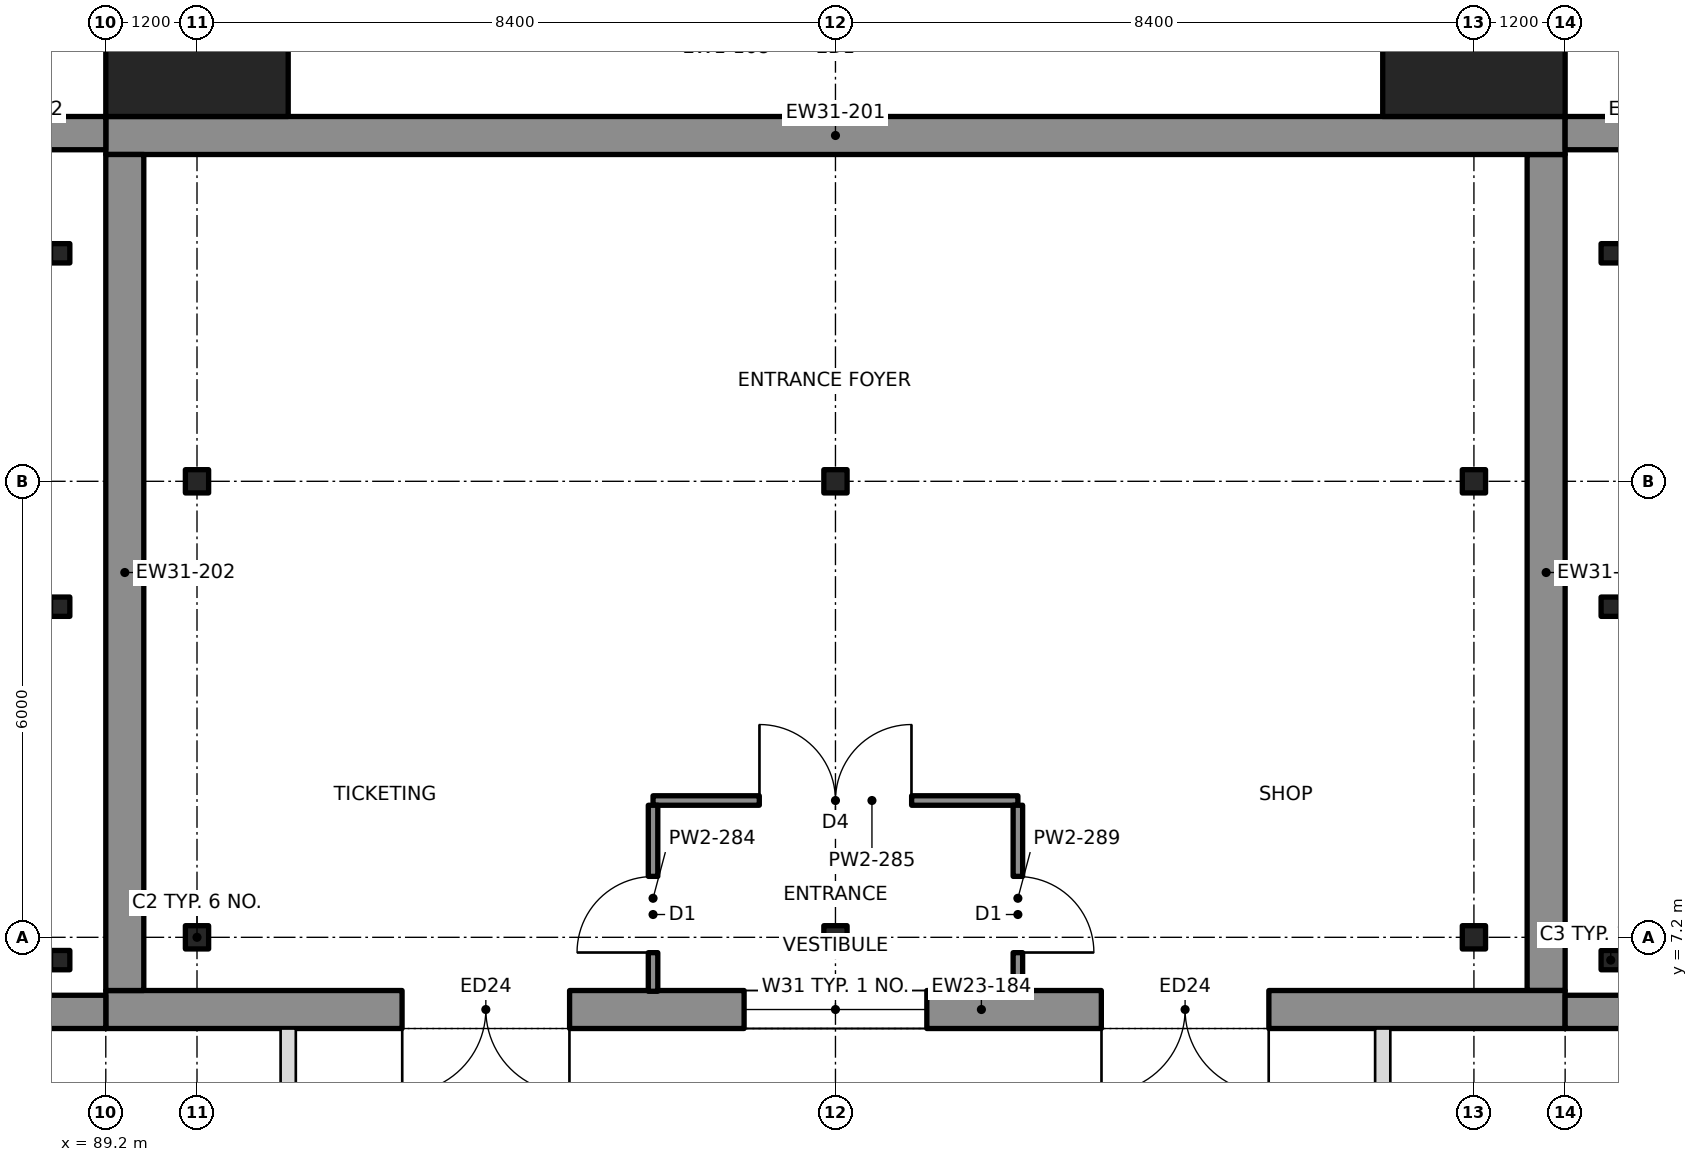
"""IFC4 building model, lengths in metres.
Left out: names, types, materials, properties, quantities, classifications, styles, units other than length and angle.
Written with IfcOpenShell. Run it as: python <this file> out.ifc"""

import sys

from ifc_helpers import new_model, si_unit, direction, frame, frame_2d, origin, origin_2d, place, context, subcontext, project, spatial, rectangle, i_section, extrude, element, fill, save


model = new_model("IFC4")
c1 = context("Model", 3, precision=1e-05, world=origin(), true_north=direction((0.0, 1.0)))
c2 = subcontext(c1, "Body", "Model", "MODEL_VIEW")
j1 = project(units=[si_unit("LENGTHUNIT", "METRE"), si_unit("PLANEANGLEUNIT", "RADIAN")], contexts=[c1])
p1 = place(None, origin())
s1 = spatial("IfcSite", under=j1, at=p1, CompositionType="ELEMENT")
p2 = place(p1, origin())
s2 = spatial("IfcBuilding", under=s1, at=p2, CompositionType="ELEMENT")
p3 = place(p2, origin())
s3 = spatial("IfcBuildingStorey", under=s2, at=p3, CompositionType="ELEMENT", Elevation=0.0)
for number, where, z_axis, x_axis in (
    (1, (90.4, 19.2, -0.9), (0.0, 0.0, 1.0), (1.0, 0.0, 0.0)),
    (2, (107.2, 19.2, -0.9), (0.0, 0.0, 1.0), (1.0, 0.0, 0.0)),
):
    element("IfcColumn", number, at=place(p3, frame(where, z_axis=z_axis, x_axis=x_axis)), inside=s3, PredefinedType="COLUMN", context=c2, shape_type="SweptSolid", body=[
        extrude(rectangle(XDim=2.4, YDim=2.4, at=origin_2d()), origin(), (0.0, 0.0, 1.0), 5.3),
    ])
for number, where, z_axis, x_axis in (
    (3, (90.4, 7.2, -1.5), (0.0, 0.0, 1.0), (1.0, 0.0, 0.0)),
    (4, (90.4, 13.2, -1.5), (0.0, 0.0, 1.0), (1.0, 0.0, 0.0)),
    (5, (98.8, 7.2, -1.5), (0.0, 0.0, 1.0), (1.0, 0.0, 0.0)),
    (6, (98.8, 13.2, -1.5), (0.0, 0.0, 1.0), (1.0, 0.0, 0.0)),
    (7, (107.2, 7.2, -1.5), (0.0, 0.0, 1.0), (1.0, 0.0, 0.0)),
    (8, (107.2, 13.2, -1.5), (0.0, 0.0, 1.0), (1.0, 0.0, 0.0)),
):
    element("IfcColumn", number, at=place(p3, frame(where, z_axis=z_axis, x_axis=x_axis)), inside=s3, PredefinedType="COLUMN", context=c2, shape_type="SweptSolid", body=[
        extrude(i_section(OverallWidth=0.306, OverallDepth=0.311, WebThickness=0.011, FlangeThickness=0.017, at=origin_2d()), origin(), (0.0, 0.0, 1.0), 5.9),
    ])
for number, where, z_axis, x_axis in (
    (9, (88.6, 6.9, -1.5), (0.0, 0.0, 1.0), (1.0, 0.0, 0.0)),
    (10, (88.6, 11.55, -1.5), (0.0, 0.0, 1.0), (1.0, 0.0, 0.0)),
    (11, (88.6, 16.2, -1.5), (0.0, 0.0, 1.0), (1.0, 0.0, 0.0)),
    (12, (109.0, 6.9, -1.5), (0.0, 0.0, 1.0), (1.0, 0.0, 0.0)),
    (13, (109.0, 11.55, -1.5), (0.0, 0.0, 1.0), (1.0, 0.0, 0.0)),
    (14, (109.0, 16.2, -1.5), (0.0, 0.0, 1.0), (1.0, 0.0, 0.0)),
):
    element("IfcColumn", number, at=place(p3, frame(where, z_axis=z_axis, x_axis=x_axis)), inside=s3, PredefinedType="COLUMN", context=c2, shape_type="SweptSolid", body=[
        extrude(i_section(OverallWidth=0.254, OverallDepth=0.253, WebThickness=0.009, FlangeThickness=0.014, at=origin_2d()), origin(), (0.0, 0.0, 1.0), 5.345),
    ])
for number, where, z_axis, x_axis in (
    (15, (89.45, 6.5, 0.0), (0.0, 0.0, 1.0), (0.0, 1.0, 0.0)),
    (16, (108.15, 6.5, 0.0), (0.0, 0.0, 1.0), (0.0, 1.0, 0.0)),
):
    element("IfcWall", number, at=place(p3, frame(where, z_axis=z_axis, x_axis=x_axis)), inside=s3, PredefinedType="SOLIDWALL", context=c2, shape_type="SweptSolid", body=[
        extrude(rectangle(XDim=11.0, YDim=0.5, at=frame_2d((5.5, 0.0))), origin(), (0.0, 0.0, 1.0), 4.4),
    ])
p4 = place(p3, frame((89.2, 6.25, 0.0), z_axis=(0.0, 0.0, 1.0), x_axis=(1.0, 0.0, 0.0)))
e17 = element("IfcWall", 17, at=p4, inside=s3, PredefinedType="SOLIDWALL", context=c2, shape_type="SweptSolid", body=[
    extrude(rectangle(XDim=19.2, YDim=0.5, at=frame_2d((9.6, 0.0))), origin(), (0.0, 0.0, 1.0), 4.4),
])
p5 = place(p4, frame((3.9, 0.0, 0.0)))
e18 = element("IfcOpeningElement", 18, at=p5, cuts=e17, PredefinedType="OPENING", context=c2, shape_type="SweptSolid", body=[
    extrude(rectangle(XDim=2.2, YDim=2.7, at=frame_2d((1.1, 1.35))), frame((0.0, 0.26, 0.0), z_axis=(0.0, -1.0, 0.0), x_axis=(1.0, 0.0, 0.0)), (0.0, 0.0, 1.0), 0.52),
])
p6 = place(p4, frame((13.1, 0.0, 0.0)))
e19 = element("IfcOpeningElement", 19, at=p6, cuts=e17, PredefinedType="OPENING", context=c2, shape_type="SweptSolid", body=[
    extrude(rectangle(XDim=2.2, YDim=2.7, at=frame_2d((1.1, 1.35))), frame((0.0, 0.26, 0.0), z_axis=(0.0, -1.0, 0.0), x_axis=(1.0, 0.0, 0.0)), (0.0, 0.0, 1.0), 0.52),
])
p7 = place(p4, frame((8.4, 0.0, 0.6)))
e20 = element("IfcOpeningElement", 20, at=p7, cuts=e17, PredefinedType="OPENING", context=c2, shape_type="SweptSolid", body=[
    extrude(rectangle(XDim=2.4, YDim=3.0, at=frame_2d((1.2, 1.5))), frame((0.0, 0.26, 0.0), z_axis=(0.0, -1.0, 0.0), x_axis=(1.0, 0.0, 0.0)), (0.0, 0.0, 1.0), 0.52),
])
p8 = place(p3, frame((89.2, 17.75, 0.0), z_axis=(0.0, 0.0, 1.0), x_axis=(1.0, 0.0, 0.0)))
e21 = element("IfcWall", 21, at=p8, inside=s3, PredefinedType="SOLIDWALL", context=c2, shape_type="SweptSolid", body=[
    extrude(rectangle(XDim=19.2, YDim=0.5, at=frame_2d((9.6, 0.0))), origin(), (0.0, 0.0, 1.0), 4.4),
])
p9 = place(p3, frame((86.038, 6.219, 0.0), z_axis=(0.0, 0.0, 1.0), x_axis=(1.0, 0.0, 0.0)))
e22 = element("IfcWall", 22, at=p9, inside=s3, PredefinedType="SOLIDWALL", context=c2, shape_type="SweptSolid", body=[
    extrude(rectangle(XDim=3.162, YDim=0.438, at=frame_2d((1.581, 0.0))), origin(), (0.0, 0.0, 1.0), 4.4),
])
p10 = place(p3, frame((86.75, 17.781, -0.9), z_axis=(0.0, 0.0, 1.0), x_axis=(1.0, 0.0, 0.0)))
e23 = element("IfcWall", 23, at=p10, inside=s3, PredefinedType="SOLIDWALL", context=c2, shape_type="SweptSolid", body=[
    extrude(rectangle(XDim=2.45, YDim=0.438, at=frame_2d((1.225, 0.0))), origin(), (0.0, 0.0, 1.0), 5.3),
])
p11 = place(p3, frame((108.4, 6.219, 0.0), z_axis=(0.0, 0.0, 1.0), x_axis=(1.0, 0.0, 0.0)))
e24 = element("IfcWall", 24, at=p11, inside=s3, PredefinedType="SOLIDWALL", context=c2, shape_type="SweptSolid", body=[
    extrude(rectangle(XDim=3.163, YDim=0.438, at=frame_2d((1.581, 0.0))), origin(), (0.0, 0.0, 1.0), 4.4),
])
p12 = place(p3, frame((108.4, 17.781, -0.9), z_axis=(0.0, 0.0, 1.0), x_axis=(1.0, 0.0, 0.0)))
e25 = element("IfcWall", 25, at=p12, inside=s3, PredefinedType="SOLIDWALL", context=c2, shape_type="SweptSolid", body=[
    extrude(rectangle(XDim=2.45, YDim=0.438, at=frame_2d((1.225, 0.0))), origin(), (0.0, 0.0, 1.0), 5.3),
])
p13 = place(p3, frame((96.4, 9.0, 0.0), z_axis=(0.0, 0.0, 1.0), x_axis=(1.0, 0.0, 0.0)))
e26 = element("IfcWall", 26, at=p13, inside=s3, PredefinedType="PARTITIONING", context=c2, shape_type="SweptSolid", body=[
    extrude(rectangle(XDim=4.8, YDim=0.125, at=frame_2d((2.4, 0.0))), origin(), (0.0, 0.0, 1.0), 3.65),
])
p14 = place(p13, frame((1.4, 0.0, 0.0)))
e27 = element("IfcOpeningElement", 27, at=p14, cuts=e26, PredefinedType="OPENING", context=c2, shape_type="SweptSolid", body=[
    extrude(rectangle(XDim=2.0, YDim=2.1, at=frame_2d((1.0, 1.05))), frame((0.0, 0.073, 0.0), z_axis=(0.0, -1.0, 0.0), x_axis=(1.0, 0.0, 0.0)), (0.0, 0.0, 1.0), 0.145),
])
p15 = place(p3, frame((96.4, 6.49, 0.0), z_axis=(0.0, 0.0, 1.0), x_axis=(0.0, 1.0, 0.0)))
e28 = element("IfcWall", 28, at=p15, inside=s3, PredefinedType="PARTITIONING", context=c2, shape_type="SweptSolid", body=[
    extrude(rectangle(XDim=2.448, YDim=0.125, at=frame_2d((1.224, 0.0))), origin(), (0.0, 0.0, 1.0), 3.65),
])
p16 = place(p15, frame((0.51, 0.0, 0.0)))
e29 = element("IfcOpeningElement", 29, at=p16, cuts=e28, PredefinedType="OPENING", context=c2, shape_type="SweptSolid", body=[
    extrude(rectangle(XDim=1.0, YDim=2.1, at=frame_2d((0.5, 1.05))), frame((0.0, 0.073, 0.0), z_axis=(0.0, -1.0, 0.0), x_axis=(1.0, 0.0, 0.0)), (0.0, 0.0, 1.0), 0.145),
])
p17 = place(p3, frame((101.2, 6.49, 0.0), z_axis=(0.0, 0.0, 1.0), x_axis=(0.0, 1.0, 0.0)))
e30 = element("IfcWall", 30, at=p17, inside=s3, PredefinedType="PARTITIONING", context=c2, shape_type="SweptSolid", body=[
    extrude(rectangle(XDim=2.448, YDim=0.125, at=frame_2d((1.224, 0.0))), origin(), (0.0, 0.0, 1.0), 3.65),
])
p18 = place(p17, frame((0.51, 0.0, 0.0)))
e31 = element("IfcOpeningElement", 31, at=p18, cuts=e30, PredefinedType="OPENING", context=c2, shape_type="SweptSolid", body=[
    extrude(rectangle(XDim=1.0, YDim=2.1, at=frame_2d((0.5, 1.05))), frame((0.0, 0.073, 0.0), z_axis=(0.0, -1.0, 0.0), x_axis=(1.0, 0.0, 0.0)), (0.0, 0.0, 1.0), 0.145),
])
p19 = place(p5, origin())
e32 = element("IfcDoor", 32, at=p19, inside=s3, OperationType="DOUBLE_DOOR_SINGLE_SWING", PredefinedType="DOOR", context=c2, shape_type="SweptSolid", body=[
    extrude(rectangle(XDim=2.2, YDim=2.7, at=frame_2d((1.1, 1.35))), frame((0.0, 0.025, 0.0), z_axis=(0.0, -1.0, 0.0), x_axis=(1.0, 0.0, 0.0)), (0.0, 0.0, 1.0), 0.05),
])
fill(e18, e32)
p20 = place(p6, origin())
e33 = element("IfcDoor", 33, at=p20, inside=s3, OperationType="DOUBLE_DOOR_SINGLE_SWING", PredefinedType="DOOR", context=c2, shape_type="SweptSolid", body=[
    extrude(rectangle(XDim=2.2, YDim=2.7, at=frame_2d((1.1, 1.35))), frame((0.0, 0.025, 0.0), z_axis=(0.0, -1.0, 0.0), x_axis=(1.0, 0.0, 0.0)), (0.0, 0.0, 1.0), 0.05),
])
fill(e19, e33)
p21 = place(p7, origin())
e34 = element("IfcWindow", 34, at=p21, inside=s3, PartitioningType="SINGLE_PANEL", PredefinedType="WINDOW", context=c2, shape_type="SweptSolid", body=[
    extrude(rectangle(XDim=2.4, YDim=3.0, at=frame_2d((1.2, 1.5))), frame((0.0, 0.03, 0.0), z_axis=(0.0, -1.0, 0.0), x_axis=(1.0, 0.0, 0.0)), (0.0, 0.0, 1.0), 0.06),
])
fill(e20, e34)
p22 = place(p14, origin())
e35 = element("IfcDoor", 35, at=p22, inside=s3, OperationType="DOUBLE_DOOR_SINGLE_SWING", PredefinedType="DOOR", context=c2, shape_type="SweptSolid", body=[
    extrude(rectangle(XDim=2.0, YDim=2.1, at=frame_2d((1.0, 1.05))), frame((0.0, 0.025, 0.0), z_axis=(0.0, -1.0, 0.0), x_axis=(1.0, 0.0, 0.0)), (0.0, 0.0, 1.0), 0.05),
])
fill(e27, e35)
p23 = place(p16, origin())
e36 = element("IfcDoor", 36, at=p23, inside=s3, OperationType="SINGLE_SWING_LEFT", PredefinedType="DOOR", context=c2, shape_type="SweptSolid", body=[
    extrude(rectangle(XDim=1.0, YDim=2.1, at=frame_2d((0.5, 1.05))), frame((0.0, 0.025, 0.0), z_axis=(0.0, -1.0, 0.0), x_axis=(1.0, 0.0, 0.0)), (0.0, 0.0, 1.0), 0.05),
])
fill(e29, e36)
p24 = place(p18, origin())
e37 = element("IfcDoor", 37, at=p24, inside=s3, OperationType="SINGLE_SWING_LEFT", PredefinedType="DOOR", context=c2, shape_type="SweptSolid", body=[
    extrude(rectangle(XDim=1.0, YDim=2.1, at=frame_2d((0.5, 1.05))), frame((0.0, 0.025, 0.0), z_axis=(0.0, -1.0, 0.0), x_axis=(1.0, 0.0, 0.0)), (0.0, 0.0, 1.0), 0.05),
])
fill(e31, e37)
save(model, sys.argv[1])
